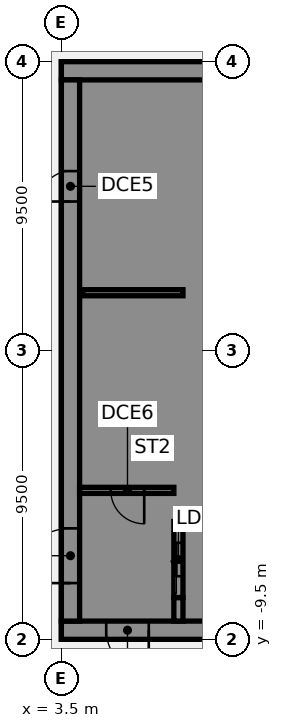
"""IFC4 building model, lengths in metres.
Left out: names, types, materials, properties, quantities, classifications, styles, units other than length and angle.
Written with IfcOpenShell. Run it as: python <this file> out.ifc"""

import sys

from ifc_helpers import new_model, si_unit, direction, frame, frame_2d, origin, place, context, subcontext, project, spatial, polyline, rectangle, outline, extrude, element, fill, save


model = new_model("IFC4")
c1 = context("Model", 3, precision=1e-05, world=origin(), true_north=direction((0.0, 1.0)))
c2 = subcontext(c1, "Body", "Model", "MODEL_VIEW")
j1 = project(units=[si_unit("LENGTHUNIT", "METRE"), si_unit("PLANEANGLEUNIT", "RADIAN")], contexts=[c1])
p1 = place(None, origin())
s1 = spatial("IfcSite", under=j1, at=p1, CompositionType="ELEMENT")
p2 = place(p1, origin())
s2 = spatial("IfcBuilding", under=s1, at=p2, CompositionType="ELEMENT")
p3 = place(p2, frame((0.0, 0.0, 98.5)))
s3 = spatial("IfcBuildingStorey", under=s2, at=p3, CompositionType="ELEMENT", Elevation=98.5)
p4 = place(p3, frame((16.5, -9.2, 0.0), z_axis=(0.0, 0.0, 1.0), x_axis=(-1.0, 0.0, 0.0)))
e1 = element("IfcWall", 1, at=p4, inside=s3, PredefinedType="SHEAR", context=c2, shape_type="SweptSolid", body=[
    extrude(rectangle(XDim=13.0, YDim=0.6, at=frame_2d((6.5, 0.0))), origin(), (0.0, 0.0, 1.0), 3.61),
])
p5 = place(p4, frame((4.15, 0.0, 0.0)))
e2 = element("IfcOpeningElement", 2, at=p5, cuts=e1, PredefinedType="OPENING", context=c2, shape_type="SweptSolid", body=[
    extrude(rectangle(XDim=1.4, YDim=2.1, at=frame_2d((0.7, 1.05))), frame((0.0, 0.31, 0.0), z_axis=(0.0, -1.0, 0.0), x_axis=(1.0, 0.0, 0.0)), (0.0, 0.0, 1.0), 0.62),
])
p6 = place(p4, frame((10.125, 0.0, 0.0)))
e3 = element("IfcOpeningElement", 3, at=p6, cuts=e1, PredefinedType="OPENING", context=c2, shape_type="SweptSolid", body=[
    extrude(rectangle(XDim=1.4, YDim=2.1, at=frame_2d((0.7, 1.05))), frame((0.0, 0.31, 0.0), z_axis=(0.0, -1.0, 0.0), x_axis=(1.0, 0.0, 0.0)), (0.0, 0.0, 1.0), 0.62),
])
p7 = place(p3, frame((16.5, 9.2, 0.0), z_axis=(0.0, 0.0, 1.0), x_axis=(-1.0, 0.0, 0.0)))
e4 = element("IfcWall", 4, at=p7, inside=s3, PredefinedType="SHEAR", context=c2, shape_type="SweptSolid", body=[
    extrude(rectangle(XDim=13.0, YDim=0.6, at=frame_2d((6.5, 0.0))), origin(), (0.0, 0.0, 1.0), 3.61),
])
p8 = place(p3, origin())
e5 = element("IfcWall", 5, at=p8, inside=s3, PredefinedType="SHEAR", context=c2, shape_type="SweptSolid", body=[
    extrude(outline(polyline([(9.8, -5.375), (7.5, -5.375), (7.5, -2.875), (9.8, -2.875), (9.8, -2.625), (7.5, -2.625), (7.5, -0.125), (9.8, -0.125), (9.8, 0.125), (7.5, 0.125), (7.5, 2.625), (9.8, 2.625), (9.8, 2.875), (7.5, 2.875), (7.5, 5.375), (9.8, 5.375), (9.8, 5.625), (7.5, 5.625), (7.5, 8.125), (9.8, 8.125), (9.8, 8.9), (7.5, 8.9), (7.2, 8.9), (7.2, -5.625), (7.5, -5.625), (9.8, -5.625), (9.8, -5.375)])), origin(), (0.0, 0.0, 1.0), 3.61),
])
p9 = place(p3, origin())
e6 = element("IfcWall", 6, at=p9, inside=s3, PredefinedType="SHEAR", context=c2, shape_type="SweptSolid", body=[
    extrude(outline(polyline([(7.5, -8.125), (7.5, -8.9), (9.8, -8.9), (9.8, -8.125), (9.8, -5.625), (9.55, -5.625), (9.55, -8.125), (7.5, -8.125)])), origin(), (0.0, 0.0, 1.0), 3.61),
])
p10 = place(p3, frame((7.35, -8.9, 0.0), z_axis=(0.0, 0.0, 1.0), x_axis=(0.0, 1.0, 0.0)))
e7 = element("IfcWall", 7, at=p10, inside=s3, PredefinedType="SHEAR", context=c2, shape_type="SweptSolid", body=[
    extrude(rectangle(XDim=0.775, YDim=0.3, at=frame_2d((0.387, 0.0))), origin(), (0.0, 0.0, 1.0), 3.61),
])
p11 = place(p3, frame((7.5, 1.9, 0.0), z_axis=(0.0, 0.0, 1.0), x_axis=(-1.0, 0.0, 0.0)))
e8 = element("IfcWall", 8, at=p11, inside=s3, PredefinedType="SHEAR", context=c2, shape_type="SweptSolid", body=[
    extrude(rectangle(XDim=3.3, YDim=0.2, at=frame_2d((1.65, 0.0))), origin(), (0.0, 0.0, 1.0), 3.61),
])
p12 = place(p3, frame((7.35, -8.125, 0.0), z_axis=(0.0, 0.0, 1.0), x_axis=(0.0, 1.0, 0.0)))
e9 = element("IfcWall", 9, at=p12, inside=s3, PredefinedType="SHEAR", context=c2, shape_type="SweptSolid", body=[
    extrude(rectangle(XDim=2.5, YDim=0.3, at=frame_2d((1.25, 0.0))), origin(), (0.0, 0.0, 1.0), 3.61),
])
p13 = place(p12, frame((0.7, 0.0, 0.0)))
e10 = element("IfcOpeningElement", 10, at=p13, cuts=e9, PredefinedType="OPENING", context=c2, shape_type="SweptSolid", body=[
    extrude(rectangle(XDim=1.1, YDim=2.1, at=frame_2d((0.55, 1.05))), frame((0.0, 0.16, 0.0), z_axis=(0.0, -1.0, 0.0), x_axis=(1.0, 0.0, 0.0)), (0.0, 0.0, 1.0), 0.32),
])
p14 = place(p3, frame((3.8, -8.9, 0.0), z_axis=(0.0, 0.0, 1.0), x_axis=(0.0, 1.0, 0.0)))
e11 = element("IfcWall", 11, at=p14, inside=s3, PredefinedType="SHEAR", context=c2, shape_type="SweptSolid", body=[
    extrude(rectangle(XDim=17.8, YDim=0.6, at=frame_2d((8.9, 0.0))), origin(), (0.0, 0.0, 1.0), 3.61),
])
p15 = place(p14, frame((1.25, 0.0, 0.0)))
e12 = element("IfcOpeningElement", 12, at=p15, cuts=e11, PredefinedType="OPENING", context=c2, shape_type="SweptSolid", body=[
    extrude(rectangle(XDim=1.8, YDim=2.1, at=frame_2d((0.9, 1.05))), frame((0.0, 0.31, 0.0), z_axis=(0.0, -1.0, 0.0), x_axis=(1.0, 0.0, 0.0)), (0.0, 0.0, 1.0), 0.62),
])
p16 = place(p14, frame((13.8, 0.0, 0.0)))
e13 = element("IfcOpeningElement", 13, at=p16, cuts=e11, PredefinedType="OPENING", context=c2, shape_type="SweptSolid", body=[
    extrude(rectangle(XDim=1.0, YDim=2.1, at=frame_2d((0.5, 1.05))), frame((0.0, 0.31, 0.0), z_axis=(0.0, -1.0, 0.0), x_axis=(1.0, 0.0, 0.0)), (0.0, 0.0, 1.0), 0.62),
])
p17 = place(p3, frame((7.2, -4.6, 0.0), z_axis=(0.0, 0.0, 1.0), x_axis=(-1.0, 0.0, 0.0)))
e14 = element("IfcWall", 14, at=p17, inside=s3, PredefinedType="SHEAR", context=c2, shape_type="SweptSolid", body=[
    extrude(rectangle(XDim=3.1, YDim=0.2, at=frame_2d((1.55, 0.0))), origin(), (0.0, 0.0, 1.0), 3.61),
])
p18 = place(p17, frame((0.975, 0.0, 0.0)))
e15 = element("IfcOpeningElement", 15, at=p18, cuts=e14, PredefinedType="OPENING", context=c2, shape_type="SweptSolid", body=[
    extrude(rectangle(XDim=1.1, YDim=2.1, at=frame_2d((0.55, 1.05))), frame((0.0, 0.11, 0.0), z_axis=(0.0, -1.0, 0.0), x_axis=(1.0, 0.0, 0.0)), (0.0, 0.0, 1.0), 0.22),
])
p19 = place(p6, origin())
e16 = element("IfcDoor", 16, at=p19, inside=s3, OperationType="SINGLE_SWING_LEFT", PredefinedType="DOOR", context=c2, shape_type="SweptSolid", body=[
    extrude(rectangle(XDim=1.4, YDim=2.1, at=frame_2d((0.7, 1.05))), frame((0.0, 0.025, 0.0), z_axis=(0.0, -1.0, 0.0), x_axis=(1.0, 0.0, 0.0)), (0.0, 0.0, 1.0), 0.05),
])
fill(e3, e16)
p20 = place(p15, origin())
e17 = element("IfcDoor", 17, at=p20, inside=s3, OperationType="SINGLE_SWING_LEFT", PredefinedType="DOOR", context=c2, shape_type="SweptSolid", body=[
    extrude(rectangle(XDim=1.8, YDim=2.1, at=frame_2d((0.9, 1.05))), frame((0.0, 0.025, 0.0), z_axis=(0.0, -1.0, 0.0), x_axis=(1.0, 0.0, 0.0)), (0.0, 0.0, 1.0), 0.05),
])
fill(e12, e17)
p21 = place(p16, origin())
e18 = element("IfcDoor", 18, at=p21, inside=s3, OperationType="SINGLE_SWING_LEFT", PredefinedType="DOOR", context=c2, shape_type="SweptSolid", body=[
    extrude(rectangle(XDim=1.0, YDim=2.1, at=frame_2d((0.5, 1.05))), frame((0.0, 0.025, 0.0), z_axis=(0.0, -1.0, 0.0), x_axis=(1.0, 0.0, 0.0)), (0.0, 0.0, 1.0), 0.05),
])
fill(e13, e18)
p22 = place(p18, origin())
e19 = element("IfcDoor", 19, at=p22, inside=s3, OperationType="SINGLE_SWING_LEFT", PredefinedType="DOOR", context=c2, shape_type="SweptSolid", body=[
    extrude(rectangle(XDim=1.1, YDim=2.1, at=frame_2d((0.55, 1.05))), frame((0.0, 0.025, 0.0), z_axis=(0.0, -1.0, 0.0), x_axis=(1.0, 0.0, 0.0)), (0.0, 0.0, 1.0), 0.05),
])
fill(e15, e19)
p23 = place(p13, origin())
e20 = element("IfcDoor", 20, at=p23, inside=s3, OperationType="SLIDING_TO_LEFT", PredefinedType="DOOR", context=c2, shape_type="SweptSolid", body=[
    extrude(rectangle(XDim=1.1, YDim=2.1, at=frame_2d((0.55, 1.05))), frame((0.0, 0.025, 0.0), z_axis=(0.0, -1.0, 0.0), x_axis=(1.0, 0.0, 0.0)), (0.0, 0.0, 1.0), 0.05),
])
fill(e10, e20)
save(model, sys.argv[1])
